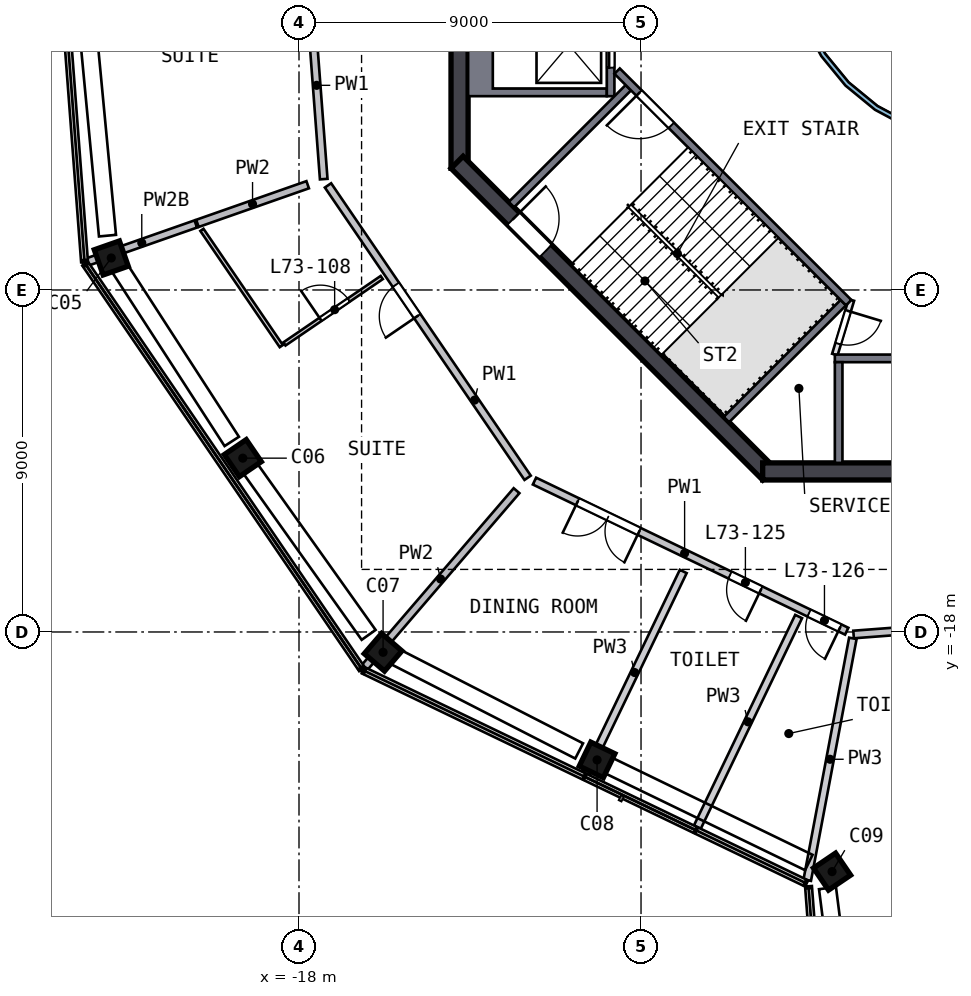
"""IFC4 building model, lengths in metres.
Left out: names, types, materials, properties, quantities, classifications, styles, units other than length and angle.
Written with IfcOpenShell. Run it as: python <this file> out.ifc"""

import sys

from ifc_helpers import new_model, si_unit, direction, frame, frame_2d, origin, origin_2d, place, context, subcontext, project, spatial, polyline, rectangle, outline, extrude, element, fill, save


model = new_model("IFC4")
c1 = context("Model", 3, precision=1e-05, world=origin(), true_north=direction((0.0, 1.0)))
c2 = subcontext(c1, "Body", "Model", "MODEL_VIEW")
j1 = project(units=[si_unit("LENGTHUNIT", "METRE"), si_unit("PLANEANGLEUNIT", "RADIAN")], contexts=[c1])
p1 = place(None, origin())
s1 = spatial("IfcSite", under=j1, at=p1, CompositionType="ELEMENT")
p2 = place(p1, origin())
s2 = spatial("IfcBuilding", under=s1, at=p2, CompositionType="ELEMENT")
p3 = place(p2, frame((0.0, 0.0, 295.0)))
s3 = spatial("IfcBuildingStorey", under=s2, at=p3, CompositionType="ELEMENT", Elevation=295.0)
p4 = place(p3, frame((-22.977, -8.055, 0.0), z_axis=(0.030581945, -0.084956294, 0.995915244), x_axis=(-0.329386102, 0.939868366, 0.090289813)))
e1 = element("IfcColumn", 1, at=p4, inside=s3, PredefinedType="COLUMN", context=c2, shape_type="SweptSolid", body=[
    extrude(rectangle(XDim=0.7, YDim=0.7, at=origin_2d()), origin(), (0.0, 0.0, 1.0), 4.207),
])
p5 = place(p3, frame((-19.54, -13.339, 0.0), z_axis=(0.050091388, -0.072089807, 0.996139505), x_axis=(0.561488906, -0.822815086, -0.087781218)))
e2 = element("IfcColumn", 2, at=p5, inside=s3, PredefinedType="COLUMN", context=c2, shape_type="SweptSolid", body=[
    extrude(rectangle(XDim=0.7, YDim=0.7, at=origin_2d()), origin(), (0.0, 0.0, 1.0), 4.206),
])
p6 = place(p3, frame((-15.871, -18.465, 0.0), z_axis=(0.068940137, -0.05826254, 0.995918036), x_axis=(-0.755201666, 0.649248608, 0.090259013)))
e3 = element("IfcColumn", 3, at=p6, inside=s3, PredefinedType="COLUMN", context=c2, shape_type="SweptSolid", body=[
    extrude(rectangle(XDim=0.7, YDim=0.7, at=origin_2d()), origin(), (0.0, 0.0, 1.0), 4.207),
])
p7 = place(p3, frame((-10.252, -21.322, 0.0), z_axis=(0.079403422, -0.037379974, 0.996141473), x_axis=(0.897653527, -0.43187559, -0.08775888)))
e4 = element("IfcColumn", 4, at=p7, inside=s3, PredefinedType="COLUMN", context=c2, shape_type="SweptSolid", body=[
    extrude(rectangle(XDim=0.7, YDim=0.7, at=origin_2d()), origin(), (0.0, 0.0, 1.0), 4.206),
])
p8 = place(p3, frame((-4.082, -24.288, 0.0), z_axis=(0.090170607, -0.014390161, 0.995822366), x_axis=(-0.559158455, 0.82669577, 0.062577368)))
e5 = element("IfcColumn", 5, at=p8, inside=s3, PredefinedType="COLUMN", context=c2, shape_type="SweptSolid", body=[
    extrude(rectangle(XDim=0.7, YDim=0.7, at=origin_2d()), origin(), (0.0, 0.0, 1.0), 4.208),
])
p9 = place(p3, frame((-13.775, 5.799, 0.0), z_axis=(0.0, 0.0, 1.0), x_axis=(0.0, -1.0, 0.0)))
e6 = element("IfcWall", 6, at=p9, inside=s3, PredefinedType="SHEAR", context=c2, shape_type="SweptSolid", body=[
    extrude(rectangle(XDim=11.598, YDim=0.45, at=frame_2d((5.799, 0.0))), origin(), (0.0, 0.0, 1.0), 4.5),
])
p10 = place(p9, frame((4.899, 0.0, 0.0)))
e7 = element("IfcOpeningElement", 7, at=p10, cuts=e6, PredefinedType="OPENING", context=c2, shape_type="SweptSolid", body=[
    extrude(rectangle(XDim=1.8, YDim=2.1, at=frame_2d((0.9, 1.05))), frame((0.0, 0.235, 0.0), z_axis=(0.0, -1.0, 0.0), x_axis=(1.0, 0.0, 0.0)), (0.0, 0.0, 1.0), 0.47),
])
p11 = place(p3, frame((-13.841, -5.64, 0.0), z_axis=(0.0, 0.0, 1.0), x_axis=(0.707106781, -0.707106781, 0.0)))
e8 = element("IfcWall", 8, at=p11, inside=s3, PredefinedType="SHEAR", context=c2, shape_type="SweptSolid", body=[
    extrude(rectangle(XDim=11.598, YDim=0.45, at=frame_2d((5.799, 0.0))), origin(), (0.0, 0.0, 1.0), 4.5),
])
p12 = place(p11, frame((2.099, 0.0, 0.0)))
e9 = element("IfcOpeningElement", 9, at=p12, cuts=e8, PredefinedType="OPENING", context=c2, shape_type="SweptSolid", body=[
    extrude(rectangle(XDim=1.2, YDim=2.1, at=frame_2d((0.6, 1.05))), frame((0.0, 0.235, 0.0), z_axis=(0.0, -1.0, 0.0), x_axis=(1.0, 0.0, 0.0)), (0.0, 0.0, 1.0), 0.47),
])
p13 = place(p3, frame((-5.799, -13.775, 0.0), z_axis=(0.0, 0.0, 1.0), x_axis=(1.0, 0.0, 0.0)))
e10 = element("IfcWall", 10, at=p13, inside=s3, PredefinedType="SHEAR", context=c2, shape_type="SweptSolid", body=[
    extrude(rectangle(XDim=11.598, YDim=0.45, at=frame_2d((5.799, 0.0))), origin(), (0.0, 0.0, 1.0), 4.5),
])
p14 = place(p3, origin())
e11 = element("IfcWall", 11, at=p14, inside=s3, PredefinedType="SOLIDWALL", context=c2, shape_type="SweptSolid", body=[
    extrude(outline(polyline([(-13.55, -3.9), (-13.55, -1.2), (-9.9, -1.2), (-9.9, -1.4), (-12.9, -1.4), (-12.9, -3.7), (-9.9, -3.7), (-9.9, -3.9), (-13.55, -3.9)])), origin(), (0.0, 0.0, 1.0), 4.19),
])
p15 = place(p3, frame((-9.8, -1.2, 0.0), z_axis=(0.0, 0.0, 1.0), x_axis=(0.0, -1.0, 0.0)))
e12 = element("IfcWall", 12, at=p15, inside=s3, PredefinedType="SOLIDWALL", context=c2, shape_type="SweptSolid", body=[
    extrude(rectangle(XDim=2.7, YDim=0.2, at=frame_2d((1.35, 0.0))), origin(), (0.0, 0.0, 1.0), 4.19),
])
p16 = place(p15, frame((0.75, 0.0, 0.0)))
e13 = element("IfcOpeningElement", 13, at=p16, cuts=e12, PredefinedType="OPENING", context=c2, shape_type="SweptSolid", body=[
    extrude(rectangle(XDim=1.2, YDim=2.1, at=frame_2d((0.6, 1.05))), frame((0.0, 0.11, 0.0), z_axis=(0.0, -1.0, 0.0), x_axis=(1.0, 0.0, 0.0)), (0.0, 0.0, 1.0), 0.22),
])
p17 = place(p3, frame((-3.9, -10.8, 0.0), z_axis=(0.0, 0.0, 1.0), x_axis=(1.0, 0.0, 0.0)))
e14 = element("IfcWall", 14, at=p17, inside=s3, PredefinedType="SOLIDWALL", context=c2, shape_type="SweptSolid", body=[
    extrude(rectangle(XDim=7.8, YDim=0.2, at=frame_2d((3.9, 0.0))), origin(), (0.0, 0.0, 1.0), 4.19),
])
p18 = place(p17, frame((3.45, 0.0, 0.0)))
e15 = element("IfcOpeningElement", 15, at=p18, cuts=e14, PredefinedType="OPENING", context=c2, shape_type="SweptSolid", body=[
    extrude(rectangle(XDim=0.9, YDim=2.1, at=frame_2d((0.45, 1.05))), frame((0.0, 0.11, 0.0), z_axis=(0.0, -1.0, 0.0), x_axis=(1.0, 0.0, 0.0)), (0.0, 0.0, 1.0), 0.22),
])
p19 = place(p3, frame((-3.8, -10.9, 0.0), z_axis=(0.0, 0.0, 1.0), x_axis=(0.0, -1.0, 0.0)))
e16 = element("IfcWall", 16, at=p19, inside=s3, PredefinedType="SOLIDWALL", context=c2, shape_type="SweptSolid", body=[
    extrude(rectangle(XDim=2.65, YDim=0.2, at=frame_2d((1.325, 0.0))), origin(), (0.0, 0.0, 1.0), 4.19),
])
p20 = place(p3, frame((-3.535, -9.334, 0.0), z_axis=(0.0, 0.0, 1.0), x_axis=(-0.707120946, 0.707092617, 0.0)))
e17 = element("IfcWall", 17, at=p20, inside=s3, PredefinedType="SOLIDWALL", context=c2, shape_type="SweptSolid", body=[
    extrude(rectangle(XDim=8.618, YDim=0.2, at=frame_2d((4.309, 0.0))), origin(), (0.0, 0.0, 1.0), 4.19),
])
p21 = place(p20, frame((6.6, 0.0, 0.0)))
e18 = element("IfcOpeningElement", 18, at=p21, cuts=e17, PredefinedType="OPENING", context=c2, shape_type="SweptSolid", body=[
    extrude(rectangle(XDim=1.2, YDim=2.1, at=frame_2d((0.6, 1.05))), frame((0.0, 0.11, 0.0), z_axis=(0.0, -1.0, 0.0), x_axis=(1.0, 0.0, 0.0)), (0.0, 0.0, 1.0), 0.22),
])
for number, where, z_axis, x_axis in (
    (19, (-9.334, -3.677, 0.0), (0.0, 0.0, 1.0), (-0.707, -0.707, 0.0)),
    (20, (-3.677, -9.334, 0.0), (0.0, 0.0, 1.0), (-0.707, -0.707, 0.0)),
):
    element("IfcWall", number, at=place(p3, frame(where, z_axis=z_axis, x_axis=x_axis)), inside=s3, PredefinedType="SOLIDWALL", context=c2, shape_type="SweptSolid", body=[
        extrude(rectangle(XDim=4.35, YDim=0.2, at=frame_2d((2.175, 0.0))), origin(), (0.0, 0.0, 1.0), 4.19),
    ])
p22 = place(p3, frame((-3.465, -9.263, 0.0), z_axis=(0.0, 0.0, 1.0), x_axis=(-0.289808785, -0.957084567, 0.0)))
e21 = element("IfcWall", 21, at=p22, inside=s3, PredefinedType="PARTITIONING", context=c2, shape_type="SweptSolid", body=[
    extrude(rectangle(XDim=1.501, YDim=0.15, at=frame_2d((0.75, 0.0))), origin(), (0.0, 0.0, 1.0), 4.19),
])
p23 = place(p22, frame((0.301, 0.0, 0.0)))
e22 = element("IfcOpeningElement", 22, at=p23, cuts=e21, PredefinedType="OPENING", context=c2, shape_type="SweptSolid", body=[
    extrude(rectangle(XDim=0.9, YDim=2.1, at=frame_2d((0.45, 1.05))), frame((0.0, 0.085, 0.0), z_axis=(0.0, -1.0, 0.0), x_axis=(1.0, 0.0, 0.0)), (0.0, 0.0, 1.0), 0.17),
])
p24 = place(p3, origin())
e23 = element("IfcWall", 23, at=p24, inside=s3, PredefinedType="SOLIDWALL", context=c2, shape_type="SweptSolid", body=[
    extrude(outline(polyline([(5.021, -0.999), (4.73, -1.959), (4.257, -2.844), (3.62, -3.62), (2.844, -4.257), (1.959, -4.73), (0.999, -5.021), (0.0, -5.12), (-0.999, -5.021), (-1.959, -4.73), (-2.844, -4.257), (-3.62, -3.62), (-4.257, -2.844), (-4.73, -1.959), (-5.021, -0.999), (-5.12, 0.0), (-5.021, 0.999), (-4.73, 1.959), (-4.257, 2.844), (-3.62, 3.62), (-2.844, 4.257), (-1.959, 4.73), (-0.999, 5.021), (0.0, 5.12), (0.999, 5.021), (1.959, 4.73), (2.844, 4.257), (3.62, 3.62), (4.257, 2.844), (4.73, 1.959), (5.021, 0.999), (5.12, 0.0), (5.021, -0.999)]), holes=[polyline([(4.904, 0.976), (4.619, 1.913), (4.157, 2.778), (3.535, 3.535), (2.778, 4.157), (1.913, 4.619), (0.976, 4.904), (0.0, 5.0), (-0.976, 4.904), (-1.913, 4.619), (-2.778, 4.157), (-3.535, 3.535), (-4.157, 2.778), (-4.619, 1.913), (-4.904, 0.976), (-5.0, 0.0), (-4.904, -0.976), (-4.619, -1.913), (-4.157, -2.778), (-3.535, -3.535), (-2.778, -4.157), (-1.913, -4.619), (-0.976, -4.904), (0.0, -5.0), (0.976, -4.904), (1.913, -4.619), (2.778, -4.157), (3.535, -3.535), (4.157, -2.778), (4.619, -1.913), (4.904, -0.976), (5.0, 0.0), (4.904, 0.976)])]), origin(), (0.0, 0.0, 1.0), 4.19),
])
p25 = place(p3, frame((-17.35, -6.083, 0.0), z_axis=(0.0, 0.0, 1.0), x_axis=(-0.075311748, 0.997160038, 0.0)))
e24 = element("IfcWall", 24, at=p25, inside=s3, PredefinedType="SOLIDWALL", context=c2, shape_type="SweptSolid", body=[
    extrude(rectangle(XDim=9.317, YDim=0.2, at=frame_2d((4.658, 0.0))), origin(), (0.0, 0.0, 1.0), 4.19),
])
p26 = place(p25, frame((5.15, 0.0, 0.0)))
e25 = element("IfcOpeningElement", 25, at=p26, cuts=e24, PredefinedType="OPENING", context=c2, shape_type="SweptSolid", body=[
    extrude(rectangle(XDim=1.0, YDim=2.1, at=frame_2d((0.5, 1.05))), frame((0.0, 0.11, 0.0), z_axis=(0.0, -1.0, 0.0), x_axis=(1.0, 0.0, 0.0)), (0.0, 0.0, 1.0), 0.22),
])
p27 = place(p3, frame((-11.984, -13.942, 0.0), z_axis=(0.0, 0.0, 1.0), x_axis=(-0.563822163, 0.825896222, 0.0)))
e26 = element("IfcWall", 26, at=p27, inside=s3, PredefinedType="SOLIDWALL", context=c2, shape_type="SweptSolid", body=[
    extrude(rectangle(XDim=9.317, YDim=0.2, at=frame_2d((4.658, 0.0))), origin(), (0.0, 0.0, 1.0), 4.19),
])
p28 = place(p27, frame((5.15, 0.0, 0.0)))
e27 = element("IfcOpeningElement", 27, at=p28, cuts=e26, PredefinedType="OPENING", context=c2, shape_type="SweptSolid", body=[
    extrude(rectangle(XDim=1.0, YDim=2.1, at=frame_2d((0.5, 1.05))), frame((0.0, 0.11, 0.0), z_axis=(0.0, -1.0, 0.0), x_axis=(1.0, 0.0, 0.0)), (0.0, 0.0, 1.0), 0.22),
])
p29 = place(p3, frame((-3.587, -17.979, 0.0), z_axis=(0.0, 0.0, 1.0), x_axis=(-0.901234927, 0.433330828, 0.0)))
e28 = element("IfcWall", 28, at=p29, inside=s3, PredefinedType="SOLIDWALL", context=c2, shape_type="SweptSolid", body=[
    extrude(rectangle(XDim=9.116, YDim=0.2, at=frame_2d((4.558, 0.0))), origin(), (0.0, 0.0, 1.0), 4.19),
])
p30 = place(p29, frame((6.058, 0.0, 0.0)))
e29 = element("IfcOpeningElement", 29, at=p30, cuts=e28, PredefinedType="OPENING", context=c2, shape_type="SweptSolid", body=[
    extrude(rectangle(XDim=1.8, YDim=2.1, at=frame_2d((0.9, 1.05))), frame((0.0, 0.11, 0.0), z_axis=(0.0, -1.0, 0.0), x_axis=(1.0, 0.0, 0.0)), (0.0, 0.0, 1.0), 0.22),
])
p31 = place(p29, frame((2.508, 0.0, 0.0)))
e30 = element("IfcOpeningElement", 30, at=p31, cuts=e28, PredefinedType="OPENING", context=c2, shape_type="SweptSolid", body=[
    extrude(rectangle(XDim=0.9, YDim=2.1, at=frame_2d((0.45, 1.05))), frame((0.0, 0.11, 0.0), z_axis=(0.0, -1.0, 0.0), x_axis=(1.0, 0.0, 0.0)), (0.0, 0.0, 1.0), 0.22),
])
p32 = place(p29, frame((0.2, 0.0, 0.0)))
e31 = element("IfcOpeningElement", 31, at=p32, cuts=e28, PredefinedType="OPENING", context=c2, shape_type="SweptSolid", body=[
    extrude(rectangle(XDim=0.9, YDim=2.1, at=frame_2d((0.45, 1.05))), frame((0.0, 0.11, 0.0), z_axis=(0.0, -1.0, 0.0), x_axis=(1.0, 0.0, 0.0)), (0.0, 0.0, 1.0), 0.22),
])
p33 = place(p3, frame((6.083, -17.349, 0.0), z_axis=(0.0, 0.0, 1.0), x_axis=(-0.997157396, -0.07534671, 0.0)))
e32 = element("IfcWall", 32, at=p33, inside=s3, PredefinedType="SOLIDWALL", context=c2, shape_type="SweptSolid", body=[
    extrude(rectangle(XDim=9.517, YDim=0.2, at=frame_2d((4.758, 0.0))), origin(), (0.0, 0.0, 1.0), 4.19),
])
p34 = place(p33, frame((3.881, 0.0, 0.0)))
e33 = element("IfcOpeningElement", 33, at=p34, cuts=e32, PredefinedType="OPENING", context=c2, shape_type="SweptSolid", body=[
    extrude(rectangle(XDim=1.8, YDim=2.1, at=frame_2d((0.9, 1.05))), frame((0.0, 0.11, 0.0), z_axis=(0.0, -1.0, 0.0), x_axis=(1.0, 0.0, 0.0)), (0.0, 0.0, 1.0), 0.22),
])
p35 = place(p3, frame((-20.716, -7.263, 0.0), z_axis=(0.0, 0.0, 1.0), x_axis=(-0.94368127, -0.330855951, 0.0)))
e34 = element("IfcWall", 34, at=p35, inside=s3, PredefinedType="SOLIDWALL", context=c2, shape_type="SweptSolid", body=[
    extrude(rectangle(XDim=3.011, YDim=0.2, at=frame_2d((1.506, 0.0))), origin(), (0.0, 0.0, 1.0), 3.69),
])
p36 = place(p3, frame((-17.771, -6.23, 0.0), z_axis=(0.0, 0.0, 1.0), x_axis=(-0.943678725, -0.33086321, 0.0)))
e35 = element("IfcWall", 35, at=p36, inside=s3, PredefinedType="SOLIDWALL", context=c2, shape_type="SweptSolid", body=[
    extrude(rectangle(XDim=3.075, YDim=0.2, at=frame_2d((1.537, 0.0))), origin(), (0.0, 0.0, 1.0), 4.19),
])
p37 = place(p3, frame((-16.272, -18.932, 0.0), z_axis=(0.0, 0.0, 1.0), x_axis=(0.651826856, 0.75836782, 0.0)))
e36 = element("IfcWall", 36, at=p37, inside=s3, PredefinedType="SOLIDWALL", context=c2, shape_type="SweptSolid", body=[
    extrude(rectangle(XDim=6.132, YDim=0.2, at=frame_2d((3.066, 0.0))), origin(), (0.0, 0.0, 1.0), 4.19),
])
p38 = place(p3, frame((-18.466, -10.477, 0.0), z_axis=(0.0, 0.0, 1.0), x_axis=(-0.563792809, 0.82591626, 0.0)))
e37 = element("IfcWall", 37, at=p38, inside=s3, PredefinedType="PARTITIONING", context=c2, shape_type="SweptSolid", body=[
    extrude(rectangle(XDim=3.704, YDim=0.1, at=frame_2d((1.852, 0.0))), origin(), (0.0, 0.0, 1.0), 4.19),
])
p39 = place(p3, frame((-18.384, -10.421, 0.0), z_axis=(0.0, 0.0, 1.0), x_axis=(0.825905634, 0.563808375, 0.0)))
e38 = element("IfcWall", 38, at=p39, inside=s3, PredefinedType="PARTITIONING", context=c2, shape_type="SweptSolid", body=[
    extrude(rectangle(XDim=3.1, YDim=0.1, at=frame_2d((1.55, 0.0))), origin(), (0.0, 0.0, 1.0), 4.19),
])
p40 = place(p39, frame((1.15, 0.0, 0.0)))
e39 = element("IfcOpeningElement", 39, at=p40, cuts=e38, PredefinedType="OPENING", context=c2, shape_type="SweptSolid", body=[
    extrude(rectangle(XDim=0.9, YDim=2.1, at=frame_2d((0.45, 1.05))), frame((0.0, 0.06, 0.0), z_axis=(0.0, -1.0, 0.0), x_axis=(1.0, 0.0, 0.0)), (0.0, 0.0, 1.0), 0.12),
])
p41 = place(p3, frame((-7.889, -16.407, 0.0), z_axis=(0.0, 0.0, 1.0), x_axis=(-0.433345475, -0.901227884, 0.0)))
e40 = element("IfcWall", 40, at=p41, inside=s3, PredefinedType="SOLIDWALL", context=c2, shape_type="SweptSolid", body=[
    extrude(rectangle(XDim=5.903, YDim=0.2, at=frame_2d((2.951, 0.0))), origin(), (0.0, 0.0, 1.0), 4.19),
])
p42 = place(p3, frame((-4.853, -17.593, 0.0), z_axis=(0.0, 0.0, 1.0), x_axis=(-0.433345282, -0.901227977, 0.0)))
e41 = element("IfcWall", 41, at=p42, inside=s3, PredefinedType="SOLIDWALL", context=c2, shape_type="SweptSolid", body=[
    extrude(rectangle(XDim=6.15, YDim=0.2, at=frame_2d((3.075, 0.0))), origin(), (0.0, 0.0, 1.0), 4.19),
])
p43 = place(p3, frame((-4.626, -24.531, 0.0), z_axis=(0.0, 0.0, 1.0), x_axis=(0.185337796, 0.982674871, 0.0)))
e42 = element("IfcWall", 42, at=p43, inside=s3, PredefinedType="SOLIDWALL", context=c2, shape_type="SweptSolid", body=[
    extrude(rectangle(XDim=6.476, YDim=0.2, at=frame_2d((3.238, 0.0))), origin(), (0.0, 0.0, 1.0), 4.19),
])
p44 = place(p16, origin())
e43 = element("IfcDoor", 43, at=p44, inside=s3, OperationType="DOUBLE_DOOR_SLIDING", PredefinedType="DOOR", context=c2, shape_type="SweptSolid", body=[
    extrude(rectangle(XDim=1.2, YDim=2.1, at=frame_2d((0.6, 1.05))), frame((0.0, 0.025, 0.0), z_axis=(0.0, -1.0, 0.0), x_axis=(1.0, 0.0, 0.0)), (0.0, 0.0, 1.0), 0.05),
])
fill(e13, e43)
p45 = place(p21, origin())
e44 = element("IfcDoor", 44, at=p45, inside=s3, OperationType="SINGLE_SWING_RIGHT", PredefinedType="DOOR", context=c2, shape_type="SweptSolid", body=[
    extrude(rectangle(XDim=1.2, YDim=2.1, at=frame_2d((0.6, 1.05))), frame((0.0, 0.025, 0.0), z_axis=(0.0, -1.0, 0.0), x_axis=(1.0, 0.0, 0.0)), (0.0, 0.0, 1.0), 0.05),
])
fill(e18, e44)
p46 = place(p12, origin())
e45 = element("IfcDoor", 45, at=p46, inside=s3, OperationType="SINGLE_SWING_LEFT", PredefinedType="DOOR", context=c2, shape_type="SweptSolid", body=[
    extrude(rectangle(XDim=1.2, YDim=2.1, at=frame_2d((0.6, 1.05))), frame((0.0, 0.025, 0.0), z_axis=(0.0, -1.0, 0.0), x_axis=(1.0, 0.0, 0.0)), (0.0, 0.0, 1.0), 0.05),
])
fill(e9, e45)
p47 = place(p23, origin())
e46 = element("IfcDoor", 46, at=p47, inside=s3, OperationType="SINGLE_SWING_LEFT", PredefinedType="DOOR", context=c2, shape_type="SweptSolid", body=[
    extrude(rectangle(XDim=0.9, YDim=2.1, at=frame_2d((0.45, 1.05))), frame((0.0, 0.025, 0.0), z_axis=(0.0, -1.0, 0.0), x_axis=(1.0, 0.0, 0.0)), (0.0, 0.0, 1.0), 0.05),
])
fill(e22, e46)
p48 = place(p28, origin())
e47 = element("IfcDoor", 47, at=p48, inside=s3, OperationType="SINGLE_SWING_LEFT", PredefinedType="DOOR", context=c2, shape_type="SweptSolid", body=[
    extrude(rectangle(XDim=1.0, YDim=2.1, at=frame_2d((0.5, 1.05))), frame((0.0, 0.025, 0.0), z_axis=(0.0, -1.0, 0.0), x_axis=(1.0, 0.0, 0.0)), (0.0, 0.0, 1.0), 0.05),
])
fill(e27, e47)
p49 = place(p40, origin())
e48 = element("IfcDoor", 48, at=p49, inside=s3, OperationType="SINGLE_SWING_LEFT", PredefinedType="DOOR", context=c2, shape_type="SweptSolid", body=[
    extrude(rectangle(XDim=0.9, YDim=2.1, at=frame_2d((0.45, 1.05))), frame((0.0, 0.025, 0.0), z_axis=(0.0, -1.0, 0.0), x_axis=(1.0, 0.0, 0.0)), (0.0, 0.0, 1.0), 0.05),
])
fill(e39, e48)
p50 = place(p30, origin())
e49 = element("IfcDoor", 49, at=p50, inside=s3, OperationType="DOUBLE_DOOR_SINGLE_SWING", PredefinedType="DOOR", context=c2, shape_type="SweptSolid", body=[
    extrude(rectangle(XDim=1.8, YDim=2.1, at=frame_2d((0.9, 1.05))), frame((0.0, 0.025, 0.0), z_axis=(0.0, -1.0, 0.0), x_axis=(1.0, 0.0, 0.0)), (0.0, 0.0, 1.0), 0.05),
])
fill(e29, e49)
p51 = place(p31, origin())
e50 = element("IfcDoor", 50, at=p51, inside=s3, OperationType="SINGLE_SWING_LEFT", PredefinedType="DOOR", context=c2, shape_type="SweptSolid", body=[
    extrude(rectangle(XDim=0.9, YDim=2.1, at=frame_2d((0.45, 1.05))), frame((0.0, 0.025, 0.0), z_axis=(0.0, -1.0, 0.0), x_axis=(1.0, 0.0, 0.0)), (0.0, 0.0, 1.0), 0.05),
])
fill(e30, e50)
p52 = place(p32, origin())
e51 = element("IfcDoor", 51, at=p52, inside=s3, OperationType="SINGLE_SWING_LEFT", PredefinedType="DOOR", context=c2, shape_type="SweptSolid", body=[
    extrude(rectangle(XDim=0.9, YDim=2.1, at=frame_2d((0.45, 1.05))), frame((0.0, 0.025, 0.0), z_axis=(0.0, -1.0, 0.0), x_axis=(1.0, 0.0, 0.0)), (0.0, 0.0, 1.0), 0.05),
])
fill(e31, e51)
save(model, sys.argv[1])
